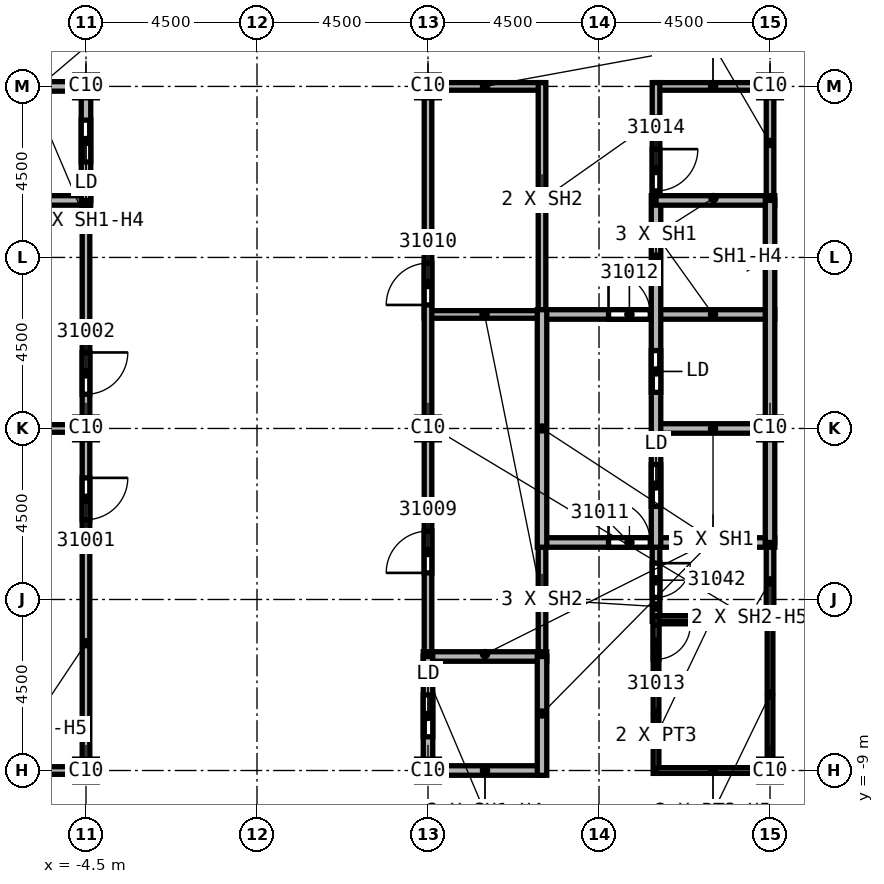
"""IFC4 building model, lengths in metres.
Left out: names, types, materials, properties, quantities, classifications, styles, units other than length and angle.
Written with IfcOpenShell. Run it as: python <this file> out.ifc"""

import sys

from ifc_helpers import new_model, si_unit, direction, frame, frame_2d, origin, origin_2d, place, context, subcontext, project, spatial, rectangle, extrude, element, fill, save


model = new_model("IFC4")
c1 = context("Model", 3, precision=1e-05, world=origin(), true_north=direction((0.0, 1.0)))
c2 = subcontext(c1, "Body", "Model", "MODEL_VIEW")
j1 = project(units=[si_unit("LENGTHUNIT", "METRE"), si_unit("PLANEANGLEUNIT", "RADIAN")], contexts=[c1])
p1 = place(None, origin())
s1 = spatial("IfcSite", under=j1, at=p1, CompositionType="ELEMENT")
p2 = place(p1, origin())
s2 = spatial("IfcBuilding", under=s1, at=p2, CompositionType="ELEMENT")
p3 = place(p2, frame((0.0, 0.0, 350.0)))
s3 = spatial("IfcBuildingStorey", under=s2, at=p3, CompositionType="ELEMENT", Elevation=350.0)
for number, where, z_axis, x_axis in (
    (1, (4.5, 0.0, 0.0), (0.0, 0.0, 1.0), (1.0, 0.0, 0.0)),
    (2, (4.5, 9.0, 0.0), (0.0, 0.0, 1.0), (1.0, 0.0, 0.0)),
    (3, (4.5, -9.0, 0.0), (0.0, 0.0, 1.0), (1.0, 0.0, 0.0)),
    (4, (13.5, 0.0, 0.0), (0.0, 0.0, 1.0), (1.0, 0.0, 0.0)),
    (5, (13.5, 9.0, 0.0), (0.0, 0.0, 1.0), (1.0, 0.0, 0.0)),
    (6, (13.5, -9.0, 0.0), (0.0, 0.0, 1.0), (1.0, 0.0, 0.0)),
    (7, (-4.5, 0.0, 0.0), (0.0, 0.0, 1.0), (1.0, 0.0, 0.0)),
    (8, (-4.5, 9.0, 0.0), (0.0, 0.0, 1.0), (1.0, 0.0, 0.0)),
    (9, (-4.5, -9.0, 0.0), (0.0, 0.0, 1.0), (1.0, 0.0, 0.0)),
):
    element("IfcColumn", number, at=place(p3, frame(where, z_axis=z_axis, x_axis=x_axis)), inside=s3, PredefinedType="COLUMN", context=c2, shape_type="SweptSolid", body=[
        extrude(rectangle(XDim=0.6, YDim=0.6, at=origin_2d()), origin(), (0.0, 0.0, 1.0), 5.6),
    ])
p4 = place(p3, frame((-7.625, 0.0, 0.0), z_axis=(0.0, 0.0, 1.0), x_axis=(1.0, 0.0, 0.0)))
e10 = element("IfcWall", 10, at=p4, inside=s3, PredefinedType="SOLIDWALL", context=c2, shape_type="SweptSolid", body=[
    extrude(rectangle(XDim=3.225, YDim=0.2, at=frame_2d((1.613, 0.0))), origin(), (0.0, 0.0, 1.0), 5.6),
])
p5 = place(p3, frame((-4.5, -9.0, 0.0), z_axis=(0.0, 0.0, 1.0), x_axis=(-1.0, 0.0, 0.0)))
e11 = element("IfcWall", 11, at=p5, inside=s3, PredefinedType="SOLIDWALL", context=c2, shape_type="SweptSolid", body=[
    extrude(rectangle(XDim=3.0, YDim=0.2, at=frame_2d((1.5, 0.0))), origin(), (0.0, 0.0, 1.0), 4.838),
])
p6 = place(p3, frame((-4.5, 6.0, 0.0), z_axis=(0.0, 0.0, 1.0), x_axis=(0.0, -1.0, 0.0)))
e12 = element("IfcWall", 12, at=p6, inside=s3, PredefinedType="SOLIDWALL", context=c2, shape_type="SweptSolid", body=[
    extrude(rectangle(XDim=15.1, YDim=0.2, at=frame_2d((7.55, 0.0))), origin(), (0.0, 0.0, 1.0), 4.838),
])
p7 = place(p6, frame((7.3, 0.0, 0.0)))
e13 = element("IfcOpeningElement", 13, at=p7, cuts=e12, PredefinedType="OPENING", context=c2, shape_type="SweptSolid", body=[
    extrude(rectangle(XDim=1.1, YDim=2.1, at=frame_2d((0.55, 1.05))), frame((0.0, 0.1, 0.0), z_axis=(0.0, -1.0, 0.0), x_axis=(1.0, 0.0, 0.0)), (0.0, 0.0, 1.0), 0.2),
])
p8 = place(p6, frame((4.0, 0.0, 0.0)))
e14 = element("IfcOpeningElement", 14, at=p8, cuts=e12, PredefinedType="OPENING", context=c2, shape_type="SweptSolid", body=[
    extrude(rectangle(XDim=1.1, YDim=2.1, at=frame_2d((0.55, 1.05))), frame((0.0, 0.1, 0.0), z_axis=(0.0, -1.0, 0.0), x_axis=(1.0, 0.0, 0.0)), (0.0, 0.0, 1.0), 0.2),
])
p9 = place(p3, frame((4.4, 3.0, 0.0), z_axis=(0.0, 0.0, 1.0), x_axis=(1.0, 0.0, 0.0)))
e15 = element("IfcWall", 15, at=p9, inside=s3, PredefinedType="SOLIDWALL", context=c2, shape_type="SweptSolid", body=[
    extrude(rectangle(XDim=3.225, YDim=0.2, at=frame_2d((1.613, 0.0))), origin(), (0.0, 0.0, 1.0), 5.6),
])
p10 = place(p3, frame((4.5, -6.0, 0.0), z_axis=(0.0, 0.0, 1.0), x_axis=(0.0, 1.0, 0.0)))
e16 = element("IfcWall", 16, at=p10, inside=s3, PredefinedType="SOLIDWALL", context=c2, shape_type="SweptSolid", body=[
    extrude(rectangle(XDim=15.1, YDim=0.2, at=frame_2d((7.55, 0.0))), origin(), (0.0, 0.0, 1.0), 4.838),
])
p11 = place(p10, frame((2.2, 0.0, 0.0)))
e17 = element("IfcOpeningElement", 17, at=p11, cuts=e16, PredefinedType="OPENING", context=c2, shape_type="SweptSolid", body=[
    extrude(rectangle(XDim=1.1, YDim=2.1, at=frame_2d((0.55, 1.05))), frame((0.0, 0.1, 0.0), z_axis=(0.0, -1.0, 0.0), x_axis=(1.0, 0.0, 0.0)), (0.0, 0.0, 1.0), 0.2),
])
p12 = place(p10, frame((9.25, 0.0, 0.0)))
e18 = element("IfcOpeningElement", 18, at=p12, cuts=e16, PredefinedType="OPENING", context=c2, shape_type="SweptSolid", body=[
    extrude(rectangle(XDim=1.1, YDim=2.1, at=frame_2d((0.55, 1.05))), frame((0.0, 0.1, 0.0), z_axis=(0.0, -1.0, 0.0), x_axis=(1.0, 0.0, 0.0)), (0.0, 0.0, 1.0), 0.2),
])
p13 = place(p3, frame((4.5, 9.0, 0.0), z_axis=(0.0, 0.0, 1.0), x_axis=(1.0, 0.0, 0.0)))
e19 = element("IfcWall", 19, at=p13, inside=s3, PredefinedType="SOLIDWALL", context=c2, shape_type="SweptSolid", body=[
    extrude(rectangle(XDim=3.0, YDim=0.2, at=frame_2d((1.5, 0.0))), origin(), (0.0, 0.0, 1.0), 4.838),
])
p14 = place(p3, frame((7.5, -2.875, 0.0), z_axis=(0.0, 0.0, 1.0), x_axis=(0.0, -1.0, 0.0)))
e20 = element("IfcWall", 20, at=p14, inside=s3, PredefinedType="SOLIDWALL", context=c2, shape_type="SweptSolid", body=[
    extrude(rectangle(XDim=3.125, YDim=0.2, at=frame_2d((1.562, 0.0))), origin(), (0.0, 0.0, 1.0), 5.6),
])
p15 = place(p3, frame((7.5, 9.1, 0.0), z_axis=(0.0, 0.0, 1.0), x_axis=(0.0, -1.0, 0.0)))
e21 = element("IfcWall", 21, at=p15, inside=s3, PredefinedType="SOLIDWALL", context=c2, shape_type="SweptSolid", body=[
    extrude(rectangle(XDim=6.225, YDim=0.2, at=frame_2d((3.113, 0.0))), origin(), (0.0, 0.0, 1.0), 5.6),
])
p16 = place(p3, frame((10.5, -2.875, 0.0), z_axis=(0.0, 0.0, 1.0), x_axis=(0.0, -1.0, 0.0)))
e22 = element("IfcWall", 22, at=p16, inside=s3, PredefinedType="SOLIDWALL", context=c2, shape_type="SweptSolid", body=[
    extrude(rectangle(XDim=2.2, YDim=0.2, at=frame_2d((1.1, 0.0))), origin(), (0.0, 0.0, 1.0), 5.6),
])
p17 = place(p16, frame((0.67, 0.0, 0.0)))
e23 = element("IfcOpeningElement", 23, at=p17, cuts=e22, PredefinedType="OPENING", context=c2, shape_type="SweptSolid", body=[
    extrude(rectangle(XDim=0.9, YDim=2.1, at=frame_2d((0.45, 1.05))), frame((0.0, 0.1, 0.0), z_axis=(0.0, -1.0, 0.0), x_axis=(1.0, 0.0, 0.0)), (0.0, 0.0, 1.0), 0.2),
])
p18 = place(p3, frame((10.5, 9.0, 0.0), z_axis=(0.0, 0.0, 1.0), x_axis=(1.0, 0.0, 0.0)))
e24 = element("IfcWall", 24, at=p18, inside=s3, PredefinedType="SOLIDWALL", context=c2, shape_type="SweptSolid", body=[
    extrude(rectangle(XDim=3.0, YDim=0.2, at=frame_2d((1.5, 0.0))), origin(), (0.0, 0.0, 1.0), 4.838),
])
p19 = place(p3, frame((10.5, 9.1, 0.0), z_axis=(0.0, 0.0, 1.0), x_axis=(0.0, -1.0, 0.0)))
e25 = element("IfcWall", 25, at=p19, inside=s3, PredefinedType="SOLIDWALL", context=c2, shape_type="SweptSolid", body=[
    extrude(rectangle(XDim=3.225, YDim=0.2, at=frame_2d((1.613, 0.0))), origin(), (0.0, 0.0, 1.0), 5.6),
])
p20 = place(p19, frame((1.75, 0.0, 0.0)))
e26 = element("IfcOpeningElement", 26, at=p20, cuts=e25, PredefinedType="OPENING", context=c2, shape_type="SweptSolid", body=[
    extrude(rectangle(XDim=1.1, YDim=2.1, at=frame_2d((0.55, 1.05))), frame((0.0, 0.1, 0.0), z_axis=(0.0, -1.0, 0.0), x_axis=(1.0, 0.0, 0.0)), (0.0, 0.0, 1.0), 0.2),
])
p21 = place(p3, frame((13.5, -3.0, 0.0), z_axis=(0.0, 0.0, 1.0), x_axis=(0.0, -1.0, 0.0)))
e27 = element("IfcWall", 27, at=p21, inside=s3, PredefinedType="SOLIDWALL", context=c2, shape_type="SweptSolid", body=[
    extrude(rectangle(XDim=2.0, YDim=0.2, at=frame_2d((1.0, 0.0))), origin(), (0.0, 0.0, 1.0), 4.838),
])
p22 = place(p3, frame((13.5, 9.1, 0.0), z_axis=(0.0, 0.0, 1.0), x_axis=(0.0, -1.0, 0.0)))
e28 = element("IfcWall", 28, at=p22, inside=s3, PredefinedType="SOLIDWALL", context=c2, shape_type="SweptSolid", body=[
    extrude(rectangle(XDim=3.1, YDim=0.2, at=frame_2d((1.55, 0.0))), origin(), (0.0, 0.0, 1.0), 4.838),
])
p23 = place(p3, frame((-7.625, 6.0, 0.0), z_axis=(0.0, 0.0, 1.0), x_axis=(1.0, 0.0, 0.0)))
e29 = element("IfcWall", 29, at=p23, inside=s3, PredefinedType="SOLIDWALL", context=c2, shape_type="SweptSolid", body=[
    extrude(rectangle(XDim=3.25, YDim=0.25, at=frame_2d((1.625, 0.0))), origin(), (0.0, 0.0, 1.0), 5.6),
])
p24 = place(p3, frame((-7.5, 9.0, 0.0), z_axis=(0.0, 0.0, 1.0), x_axis=(1.0, 0.0, 0.0)))
e30 = element("IfcWall", 30, at=p24, inside=s3, PredefinedType="SOLIDWALL", context=c2, shape_type="SweptSolid", body=[
    extrude(rectangle(XDim=3.0, YDim=0.25, at=frame_2d((1.5, 0.0))), origin(), (0.0, 0.0, 1.0), 4.838),
])
p25 = place(p3, frame((-4.5, 9.125, 0.0), z_axis=(0.0, 0.0, 1.0), x_axis=(0.0, -1.0, 0.0)))
e31 = element("IfcWall", 31, at=p25, inside=s3, PredefinedType="SOLIDWALL", context=c2, shape_type="SweptSolid", body=[
    extrude(rectangle(XDim=3.125, YDim=0.25, at=frame_2d((1.562, 0.0))), origin(), (0.0, 0.0, 1.0), 4.838),
])
p26 = place(p25, frame((1.012, 0.0, 0.0)))
e32 = element("IfcOpeningElement", 32, at=p26, cuts=e31, PredefinedType="OPENING", context=c2, shape_type="SweptSolid", body=[
    extrude(rectangle(XDim=1.1, YDim=2.1, at=frame_2d((0.55, 1.05))), frame((0.0, 0.125, 0.0), z_axis=(0.0, -1.0, 0.0), x_axis=(1.0, 0.0, 0.0)), (0.0, 0.0, 1.0), 0.25),
])
p27 = place(p3, frame((4.375, -6.0, 0.0), z_axis=(0.0, 0.0, 1.0), x_axis=(1.0, 0.0, 0.0)))
e33 = element("IfcWall", 33, at=p27, inside=s3, PredefinedType="SOLIDWALL", context=c2, shape_type="SweptSolid", body=[
    extrude(rectangle(XDim=3.25, YDim=0.25, at=frame_2d((1.625, 0.0))), origin(), (0.0, 0.0, 1.0), 5.6),
])
p28 = place(p3, frame((4.5, -9.125, 0.0), z_axis=(0.0, 0.0, 1.0), x_axis=(0.0, 1.0, 0.0)))
e34 = element("IfcWall", 34, at=p28, inside=s3, PredefinedType="SOLIDWALL", context=c2, shape_type="SweptSolid", body=[
    extrude(rectangle(XDim=3.125, YDim=0.25, at=frame_2d((1.562, 0.0))), origin(), (0.0, 0.0, 1.0), 4.838),
])
p29 = place(p28, frame((1.012, 0.0, 0.0)))
e35 = element("IfcOpeningElement", 35, at=p29, cuts=e34, PredefinedType="OPENING", context=c2, shape_type="SweptSolid", body=[
    extrude(rectangle(XDim=1.1, YDim=2.1, at=frame_2d((0.55, 1.05))), frame((0.0, 0.125, 0.0), z_axis=(0.0, -1.0, 0.0), x_axis=(1.0, 0.0, 0.0)), (0.0, 0.0, 1.0), 0.25),
])
p30 = place(p3, frame((7.5, -9.0, 0.0), z_axis=(0.0, 0.0, 1.0), x_axis=(-1.0, 0.0, 0.0)))
e36 = element("IfcWall", 36, at=p30, inside=s3, PredefinedType="SOLIDWALL", context=c2, shape_type="SweptSolid", body=[
    extrude(rectangle(XDim=3.0, YDim=0.25, at=frame_2d((1.5, 0.0))), origin(), (0.0, 0.0, 1.0), 4.838),
])
p31 = place(p3, frame((7.5, -6.0, 0.0), z_axis=(0.0, 0.0, 1.0), x_axis=(0.0, -1.0, 0.0)))
e37 = element("IfcWall", 37, at=p31, inside=s3, PredefinedType="SOLIDWALL", context=c2, shape_type="SweptSolid", body=[
    extrude(rectangle(XDim=3.125, YDim=0.25, at=frame_2d((1.562, 0.0))), origin(), (0.0, 0.0, 1.0), 5.6),
])
p32 = place(p3, frame((7.5, -3.0, 0.0), z_axis=(0.0, 0.0, 1.0), x_axis=(1.0, 0.0, 0.0)))
e38 = element("IfcWall", 38, at=p32, inside=s3, PredefinedType="SOLIDWALL", context=c2, shape_type="SweptSolid", body=[
    extrude(rectangle(XDim=6.125, YDim=0.25, at=frame_2d((3.062, 0.0))), origin(), (0.0, 0.0, 1.0), 5.6),
])
p33 = place(p32, frame((1.75, 0.0, 0.0)))
e39 = element("IfcOpeningElement", 39, at=p33, cuts=e38, PredefinedType="OPENING", context=c2, shape_type="SweptSolid", body=[
    extrude(rectangle(XDim=1.1, YDim=2.1, at=frame_2d((0.55, 1.05))), frame((0.0, 0.125, 0.0), z_axis=(0.0, -1.0, 0.0), x_axis=(1.0, 0.0, 0.0)), (0.0, 0.0, 1.0), 0.25),
])
p34 = place(p3, frame((7.5, 3.0, 0.0), z_axis=(0.0, 0.0, 1.0), x_axis=(1.0, 0.0, 0.0)))
e40 = element("IfcWall", 40, at=p34, inside=s3, PredefinedType="SOLIDWALL", context=c2, shape_type="SweptSolid", body=[
    extrude(rectangle(XDim=6.125, YDim=0.25, at=frame_2d((3.062, 0.0))), origin(), (0.0, 0.0, 1.0), 5.6),
])
p35 = place(p34, frame((1.75, 0.0, 0.0)))
e41 = element("IfcOpeningElement", 41, at=p35, cuts=e40, PredefinedType="OPENING", context=c2, shape_type="SweptSolid", body=[
    extrude(rectangle(XDim=1.1, YDim=2.1, at=frame_2d((0.55, 1.05))), frame((0.0, 0.125, 0.0), z_axis=(0.0, -1.0, 0.0), x_axis=(1.0, 0.0, 0.0)), (0.0, 0.0, 1.0), 0.25),
])
p36 = place(p3, frame((7.5, 3.125, 0.0), z_axis=(0.0, 0.0, 1.0), x_axis=(0.0, -1.0, 0.0)))
e42 = element("IfcWall", 42, at=p36, inside=s3, PredefinedType="SOLIDWALL", context=c2, shape_type="SweptSolid", body=[
    extrude(rectangle(XDim=6.25, YDim=0.25, at=frame_2d((3.125, 0.0))), origin(), (0.0, 0.0, 1.0), 5.6),
])
p37 = place(p3, frame((10.5, 0.0, 0.0), z_axis=(0.0, 0.0, 1.0), x_axis=(1.0, 0.0, 0.0)))
e43 = element("IfcWall", 43, at=p37, inside=s3, PredefinedType="SOLIDWALL", context=c2, shape_type="SweptSolid", body=[
    extrude(rectangle(XDim=3.125, YDim=0.25, at=frame_2d((1.562, 0.0))), origin(), (0.0, 0.0, 1.0), 5.6),
])
p38 = place(p3, frame((10.5, 6.125, 0.0), z_axis=(0.0, 0.0, 1.0), x_axis=(0.0, -1.0, 0.0)))
e44 = element("IfcWall", 44, at=p38, inside=s3, PredefinedType="SOLIDWALL", context=c2, shape_type="SweptSolid", body=[
    extrude(rectangle(XDim=9.25, YDim=0.25, at=frame_2d((4.625, 0.0))), origin(), (0.0, 0.0, 1.0), 5.6),
])
p39 = place(p38, frame((7.075, 0.0, 0.0)))
e45 = element("IfcOpeningElement", 45, at=p39, cuts=e44, PredefinedType="OPENING", context=c2, shape_type="SweptSolid", body=[
    extrude(rectangle(XDim=1.1, YDim=2.1, at=frame_2d((0.55, 1.05))), frame((0.0, 0.125, 0.0), z_axis=(0.0, -1.0, 0.0), x_axis=(1.0, 0.0, 0.0)), (0.0, 0.0, 1.0), 0.25),
])
p40 = place(p38, frame((4.075, 0.0, 0.0)))
e46 = element("IfcOpeningElement", 46, at=p40, cuts=e44, PredefinedType="OPENING", context=c2, shape_type="SweptSolid", body=[
    extrude(rectangle(XDim=1.1, YDim=2.1, at=frame_2d((0.55, 1.05))), frame((0.0, 0.125, 0.0), z_axis=(0.0, -1.0, 0.0), x_axis=(1.0, 0.0, 0.0)), (0.0, 0.0, 1.0), 0.25),
])
p41 = place(p3, frame((10.5, 6.0, 0.0), z_axis=(0.0, 0.0, 1.0), x_axis=(1.0, 0.0, 0.0)))
e47 = element("IfcWall", 47, at=p41, inside=s3, PredefinedType="SOLIDWALL", context=c2, shape_type="SweptSolid", body=[
    extrude(rectangle(XDim=3.125, YDim=0.25, at=frame_2d((1.562, 0.0))), origin(), (0.0, 0.0, 1.0), 5.6),
])
p42 = place(p3, frame((13.5, 6.0, 0.0), z_axis=(0.0, 0.0, 1.0), x_axis=(0.0, -1.0, 0.0)))
e48 = element("IfcWall", 48, at=p42, inside=s3, PredefinedType="SOLIDWALL", context=c2, shape_type="SweptSolid", body=[
    extrude(rectangle(XDim=9.0, YDim=0.25, at=frame_2d((4.5, 0.0))), origin(), (0.0, 0.0, 1.0), 4.838),
])
p43 = place(p3, frame((10.5, -5.0, 0.0), z_axis=(0.0, 0.0, 1.0), x_axis=(1.0, 0.0, 0.0)))
e49 = element("IfcWall", 49, at=p43, inside=s3, PredefinedType="PARTITIONING", context=c2, shape_type="SweptSolid", body=[
    extrude(rectangle(XDim=3.1, YDim=0.15, at=frame_2d((1.55, 0.0))), origin(), (0.0, 0.0, 1.0), 5.6),
])
p44 = place(p3, frame((10.5, -4.925, 0.0), z_axis=(0.0, 0.0, 1.0), x_axis=(0.0, -1.0, 0.0)))
e50 = element("IfcWall", 50, at=p44, inside=s3, PredefinedType="PARTITIONING", context=c2, shape_type="SweptSolid", body=[
    extrude(rectangle(XDim=4.15, YDim=0.15, at=frame_2d((2.075, 0.0))), origin(), (0.0, 0.0, 1.0), 5.6),
])
p45 = place(p44, frame((0.25, 0.0, 0.0)))
e51 = element("IfcOpeningElement", 51, at=p45, cuts=e50, PredefinedType="OPENING", context=c2, shape_type="SweptSolid", body=[
    extrude(rectangle(XDim=0.9, YDim=2.1, at=frame_2d((0.45, 1.05))), frame((0.0, 0.075, 0.0), z_axis=(0.0, -1.0, 0.0), x_axis=(1.0, 0.0, 0.0)), (0.0, 0.0, 1.0), 0.15),
])
p46 = place(p3, frame((13.5, -9.0, 0.0), z_axis=(0.0, 0.0, 1.0), x_axis=(-1.0, 0.0, 0.0)))
e52 = element("IfcWall", 52, at=p46, inside=s3, PredefinedType="PARTITIONING", context=c2, shape_type="SweptSolid", body=[
    extrude(rectangle(XDim=3.0, YDim=0.15, at=frame_2d((1.5, 0.0))), origin(), (0.0, 0.0, 1.0), 4.838),
])
p47 = place(p3, frame((13.5, -5.0, 0.0), z_axis=(0.0, 0.0, 1.0), x_axis=(0.0, -1.0, 0.0)))
e53 = element("IfcWall", 53, at=p47, inside=s3, PredefinedType="PARTITIONING", context=c2, shape_type="SweptSolid", body=[
    extrude(rectangle(XDim=4.075, YDim=0.15, at=frame_2d((2.038, 0.0))), origin(), (0.0, 0.0, 1.0), 4.838),
])
p48 = place(p7, origin())
e54 = element("IfcDoor", 54, at=p48, inside=s3, OperationType="SINGLE_SWING_RIGHT", PredefinedType="DOOR", context=c2, shape_type="SweptSolid", body=[
    extrude(rectangle(XDim=1.1, YDim=2.1, at=frame_2d((0.55, 1.05))), frame((0.0, 0.025, 0.0), z_axis=(0.0, -1.0, 0.0), x_axis=(1.0, 0.0, 0.0)), (0.0, 0.0, 1.0), 0.05),
])
fill(e13, e54)
p49 = place(p8, origin())
e55 = element("IfcDoor", 55, at=p49, inside=s3, OperationType="SINGLE_SWING_LEFT", PredefinedType="DOOR", context=c2, shape_type="SweptSolid", body=[
    extrude(rectangle(XDim=1.1, YDim=2.1, at=frame_2d((0.55, 1.05))), frame((0.0, 0.025, 0.0), z_axis=(0.0, -1.0, 0.0), x_axis=(1.0, 0.0, 0.0)), (0.0, 0.0, 1.0), 0.05),
])
fill(e14, e55)
p50 = place(p11, origin())
e56 = element("IfcDoor", 56, at=p50, inside=s3, OperationType="SINGLE_SWING_RIGHT", PredefinedType="DOOR", context=c2, shape_type="SweptSolid", body=[
    extrude(rectangle(XDim=1.1, YDim=2.1, at=frame_2d((0.55, 1.05))), frame((0.0, 0.025, 0.0), z_axis=(0.0, -1.0, 0.0), x_axis=(1.0, 0.0, 0.0)), (0.0, 0.0, 1.0), 0.05),
])
fill(e17, e56)
p51 = place(p12, origin())
e57 = element("IfcDoor", 57, at=p51, inside=s3, OperationType="SINGLE_SWING_LEFT", PredefinedType="DOOR", context=c2, shape_type="SweptSolid", body=[
    extrude(rectangle(XDim=1.1, YDim=2.1, at=frame_2d((0.55, 1.05))), frame((0.0, 0.025, 0.0), z_axis=(0.0, -1.0, 0.0), x_axis=(1.0, 0.0, 0.0)), (0.0, 0.0, 1.0), 0.05),
])
fill(e18, e57)
p52 = place(p33, origin())
e58 = element("IfcDoor", 58, at=p52, inside=s3, OperationType="SINGLE_SWING_RIGHT", PredefinedType="DOOR", context=c2, shape_type="SweptSolid", body=[
    extrude(rectangle(XDim=1.1, YDim=2.1, at=frame_2d((0.55, 1.05))), frame((0.0, 0.025, 0.0), z_axis=(0.0, -1.0, 0.0), x_axis=(1.0, 0.0, 0.0)), (0.0, 0.0, 1.0), 0.05),
])
fill(e39, e58)
p53 = place(p35, origin())
e59 = element("IfcDoor", 59, at=p53, inside=s3, OperationType="SINGLE_SWING_LEFT", PredefinedType="DOOR", context=c2, shape_type="SweptSolid", body=[
    extrude(rectangle(XDim=1.1, YDim=2.1, at=frame_2d((0.55, 1.05))), frame((0.0, 0.025, 0.0), z_axis=(0.0, -1.0, 0.0), x_axis=(1.0, 0.0, 0.0)), (0.0, 0.0, 1.0), 0.05),
])
fill(e41, e59)
p54 = place(p45, origin())
e60 = element("IfcDoor", 60, at=p54, inside=s3, OperationType="SINGLE_SWING_RIGHT", PredefinedType="DOOR", context=c2, shape_type="SweptSolid", body=[
    extrude(rectangle(XDim=0.9, YDim=2.1, at=frame_2d((0.45, 1.05))), frame((0.0, 0.025, 0.0), z_axis=(0.0, -1.0, 0.0), x_axis=(1.0, 0.0, 0.0)), (0.0, 0.0, 1.0), 0.05),
])
fill(e51, e60)
p55 = place(p20, origin())
e61 = element("IfcDoor", 61, at=p55, inside=s3, OperationType="SINGLE_SWING_LEFT", PredefinedType="DOOR", context=c2, shape_type="SweptSolid", body=[
    extrude(rectangle(XDim=1.1, YDim=2.1, at=frame_2d((0.55, 1.05))), frame((0.0, 0.025, 0.0), z_axis=(0.0, -1.0, 0.0), x_axis=(1.0, 0.0, 0.0)), (0.0, 0.0, 1.0), 0.05),
])
fill(e26, e61)
p56 = place(p17, origin())
e62 = element("IfcDoor", 62, at=p56, inside=s3, OperationType="SINGLE_SWING_LEFT", PredefinedType="DOOR", context=c2, shape_type="SweptSolid", body=[
    extrude(rectangle(XDim=0.9, YDim=2.1, at=frame_2d((0.45, 1.05))), frame((0.0, 0.025, 0.0), z_axis=(0.0, -1.0, 0.0), x_axis=(1.0, 0.0, 0.0)), (0.0, 0.0, 1.0), 0.05),
])
fill(e23, e62)
p57 = place(p26, origin())
e63 = element("IfcDoor", 63, at=p57, inside=s3, OperationType="SLIDING_TO_LEFT", PredefinedType="DOOR", context=c2, shape_type="SweptSolid", body=[
    extrude(rectangle(XDim=1.1, YDim=2.1, at=frame_2d((0.55, 1.05))), frame((0.0, 0.025, 0.0), z_axis=(0.0, -1.0, 0.0), x_axis=(1.0, 0.0, 0.0)), (0.0, 0.0, 1.0), 0.05),
])
fill(e32, e63)
p58 = place(p29, origin())
e64 = element("IfcDoor", 64, at=p58, inside=s3, OperationType="SLIDING_TO_LEFT", PredefinedType="DOOR", context=c2, shape_type="SweptSolid", body=[
    extrude(rectangle(XDim=1.1, YDim=2.1, at=frame_2d((0.55, 1.05))), frame((0.0, 0.025, 0.0), z_axis=(0.0, -1.0, 0.0), x_axis=(1.0, 0.0, 0.0)), (0.0, 0.0, 1.0), 0.05),
])
fill(e35, e64)
p59 = place(p39, origin())
e65 = element("IfcDoor", 65, at=p59, inside=s3, OperationType="SLIDING_TO_LEFT", PredefinedType="DOOR", context=c2, shape_type="SweptSolid", body=[
    extrude(rectangle(XDim=1.1, YDim=2.1, at=frame_2d((0.55, 1.05))), frame((0.0, 0.025, 0.0), z_axis=(0.0, -1.0, 0.0), x_axis=(1.0, 0.0, 0.0)), (0.0, 0.0, 1.0), 0.05),
])
fill(e45, e65)
p60 = place(p40, origin())
e66 = element("IfcDoor", 66, at=p60, inside=s3, OperationType="SLIDING_TO_LEFT", PredefinedType="DOOR", context=c2, shape_type="SweptSolid", body=[
    extrude(rectangle(XDim=1.1, YDim=2.1, at=frame_2d((0.55, 1.05))), frame((0.0, 0.025, 0.0), z_axis=(0.0, -1.0, 0.0), x_axis=(1.0, 0.0, 0.0)), (0.0, 0.0, 1.0), 0.05),
])
fill(e46, e66)
save(model, sys.argv[1])
